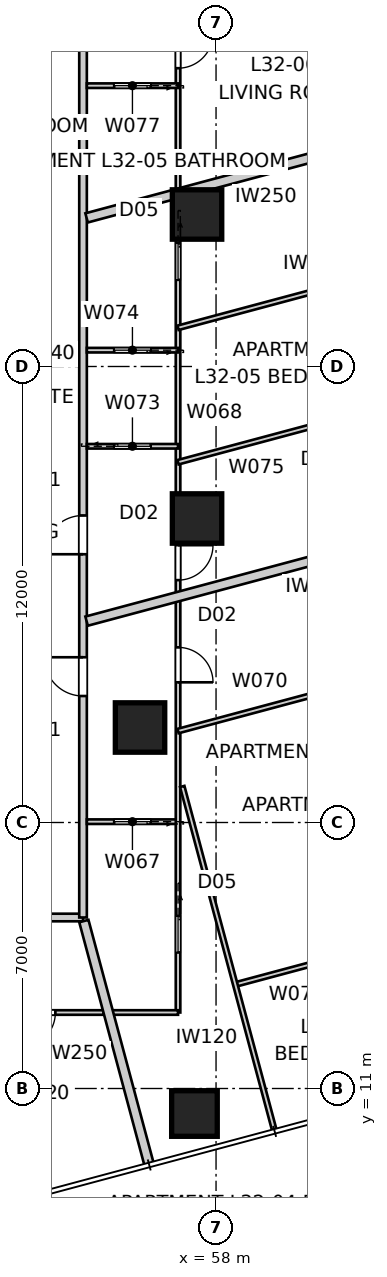
"""IFC4 building model, lengths in metres.
Left out: names, types, materials, properties, quantities, classifications, styles, units other than length and angle.
Written with IfcOpenShell. Run it as: python <this file> out.ifc"""

import sys

from ifc_helpers import new_model, si_unit, direction, frame, frame_2d, origin, origin_2d, place, context, subcontext, project, spatial, rectangle, extrude, element, fill, save


model = new_model("IFC4")
c1 = context("Model", 3, precision=1e-05, world=origin(), true_north=direction((0.0, 1.0)))
c2 = subcontext(c1, "Body", "Model", "MODEL_VIEW")
j1 = project(units=[si_unit("LENGTHUNIT", "METRE"), si_unit("PLANEANGLEUNIT", "RADIAN")], contexts=[c1])
p1 = place(None, origin())
s1 = spatial("IfcSite", under=j1, at=p1, CompositionType="ELEMENT")
p2 = place(p1, origin())
s2 = spatial("IfcBuilding", under=s1, at=p2, CompositionType="ELEMENT")
p3 = place(p2, frame((0.0, 0.0, 118.4)))
s3 = spatial("IfcBuildingStorey", under=s2, at=p3, CompositionType="ELEMENT", Elevation=118.4)
p4 = place(p3, frame((57.432, 10.342, 0.0), z_axis=(0.0, 0.0, 1.0), x_axis=(1.0, 0.0, 0.0)))
e1 = element("IfcColumn", 1, at=p4, inside=s3, PredefinedType="COLUMN", context=c2, shape_type="SweptSolid", body=[
    extrude(rectangle(XDim=1.2, YDim=1.2, at=origin_2d()), origin(), (0.0, 0.0, 1.0), 3.4),
])
for number, where, z_axis, x_axis in (
    (2, (57.5, 26.0, 0.0), (0.0, 0.0, 1.0), (1.0, 0.0, 0.0)),
    (3, (57.5, 34.0, 0.0), (0.0, 0.0, 1.0), (1.0, 0.0, 0.0)),
    (4, (56.0, 20.5, 0.0), (0.0, 0.0, 1.0), (1.0, 0.0, 0.0)),
):
    element("IfcColumn", number, at=place(p3, frame(where, z_axis=z_axis, x_axis=x_axis)), inside=s3, PredefinedType="COLUMN", context=c2, shape_type="SweptSolid", body=[
        extrude(rectangle(XDim=1.3, YDim=1.3, at=origin_2d()), origin(), (0.0, 0.0, 1.0), 3.4),
    ])
p5 = place(p3, frame((26.3, 15.5, 0.0), z_axis=(0.0, 0.0, 1.0), x_axis=(1.0, 0.0, 0.0)))
e5 = element("IfcWall", 5, at=p5, inside=s3, PredefinedType="PARTITIONING", context=c2, shape_type="SweptSolid", body=[
    extrude(rectangle(XDim=28.2, YDim=0.2, at=frame_2d((14.1, 0.0))), origin(), (0.0, 0.0, 1.0), 3.25),
])
p6 = place(p5, frame((21.474, 0.0, 0.0)))
e6 = element("IfcOpeningElement", 6, at=p6, cuts=e5, PredefinedType="OPENING", context=c2, shape_type="SweptSolid", body=[
    extrude(rectangle(XDim=1.02, YDim=2.34, at=frame_2d((0.51, 1.17))), frame((0.0, 0.11, 0.0), z_axis=(0.0, -1.0, 0.0), x_axis=(1.0, 0.0, 0.0)), (0.0, 0.0, 1.0), 0.22),
])
p7 = place(p5, frame((1.353, 0.0, 0.0)))
e7 = element("IfcOpeningElement", 7, at=p7, cuts=e5, PredefinedType="OPENING", context=c2, shape_type="SweptSolid", body=[
    extrude(rectangle(XDim=1.02, YDim=2.1, at=frame_2d((0.51, 1.05))), frame((0.0, 0.11, 0.0), z_axis=(0.0, -1.0, 0.0), x_axis=(1.0, 0.0, 0.0)), (0.0, 0.0, 1.0), 0.22),
])
p8 = place(p3, frame((54.5, 15.5, 0.0), z_axis=(0.0, 0.0, 1.0), x_axis=(0.0, 1.0, 0.0)))
e8 = element("IfcWall", 8, at=p8, inside=s3, PredefinedType="PARTITIONING", context=c2, shape_type="SweptSolid", body=[
    extrude(rectangle(XDim=29.0, YDim=0.2, at=frame_2d((14.5, 0.0))), origin(), (0.0, 0.0, 1.0), 3.25),
])
p9 = place(p8, frame((24.76, 0.0, 0.0)))
e9 = element("IfcOpeningElement", 9, at=p9, cuts=e8, PredefinedType="OPENING", context=c2, shape_type="SweptSolid", body=[
    extrude(rectangle(XDim=1.02, YDim=2.1, at=frame_2d((0.51, 1.05))), frame((0.0, 0.11, 0.0), z_axis=(0.0, -1.0, 0.0), x_axis=(1.0, 0.0, 0.0)), (0.0, 0.0, 1.0), 0.22),
])
p10 = place(p8, frame((5.829, 0.0, 0.0)))
e10 = element("IfcOpeningElement", 10, at=p10, cuts=e8, PredefinedType="OPENING", context=c2, shape_type="SweptSolid", body=[
    extrude(rectangle(XDim=1.02, YDim=2.34, at=frame_2d((0.51, 1.17))), frame((0.0, 0.11, 0.0), z_axis=(0.0, -1.0, 0.0), x_axis=(1.0, 0.0, 0.0)), (0.0, 0.0, 1.0), 0.22),
])
p11 = place(p8, frame((9.559, 0.0, 0.0)))
e11 = element("IfcOpeningElement", 11, at=p11, cuts=e8, PredefinedType="OPENING", context=c2, shape_type="SweptSolid", body=[
    extrude(rectangle(XDim=1.02, YDim=2.34, at=frame_2d((0.51, 1.17))), frame((0.0, 0.11, 0.0), z_axis=(0.0, -1.0, 0.0), x_axis=(1.0, 0.0, 0.0)), (0.0, 0.0, 1.0), 0.22),
])
p12 = place(p3, frame((56.242, 8.988, 0.0), z_axis=(0.0, 0.0, 1.0), x_axis=(-0.25880587229, 0.965929355837, 0.0)))
e12 = element("IfcWall", 12, at=p12, inside=s3, PredefinedType="PARTITIONING", context=c2, shape_type="SweptSolid", body=[
    extrude(rectangle(XDim=6.645, YDim=0.25, at=frame_2d((3.322, 0.0))), origin(), (0.0, 0.0, 1.0), 3.25),
])
p13 = place(p3, frame((63.665, 36.341, 0.0), z_axis=(0.0, 0.0, 1.0), x_axis=(-0.965927049013, -0.258814481793, 0.0)))
e13 = element("IfcWall", 13, at=p13, inside=s3, PredefinedType="PARTITIONING", context=c2, shape_type="SweptSolid", body=[
    extrude(rectangle(XDim=9.392, YDim=0.25, at=frame_2d((4.696, 0.0))), origin(), (0.0, 0.0, 1.0), 3.25),
])
p14 = place(p3, frame((66.318, 26.44, 0.0), z_axis=(0.0, 0.0, 1.0), x_axis=(-0.965924438766, -0.258824223352, 0.0)))
e14 = element("IfcWall", 14, at=p14, inside=s3, PredefinedType="PARTITIONING", context=c2, shape_type="SweptSolid", body=[
    extrude(rectangle(XDim=12.138, YDim=0.25, at=frame_2d((6.069, 0.0))), origin(), (0.0, 0.0, 1.0), 3.25),
])
p15 = place(p3, frame((55.046, 13.0, 0.0), z_axis=(0.0, 0.0, 1.0), x_axis=(-1.0, 0.0, 0.0)))
e15 = element("IfcWall", 15, at=p15, inside=s3, PredefinedType="PARTITIONING", context=c2, shape_type="SweptSolid", body=[
    extrude(rectangle(XDim=23.693, YDim=0.12, at=frame_2d((11.846, 0.0))), origin(), (0.0, 0.0, 1.0), 2.55),
])
p16 = place(p15, frame((8.262, 0.0, 0.0)))
e16 = element("IfcOpeningElement", 16, at=p16, cuts=e15, PredefinedType="OPENING", context=c2, shape_type="SweptSolid", body=[
    extrude(rectangle(XDim=0.92, YDim=2.34, at=frame_2d((0.46, 1.17))), frame((0.0, 0.07, 0.0), z_axis=(0.0, -1.0, 0.0), x_axis=(1.0, 0.0, 0.0)), (0.0, 0.0, 1.0), 0.14),
])
p17 = place(p15, frame((3.825, 0.0, 0.0)))
e17 = element("IfcOpeningElement", 17, at=p17, cuts=e15, PredefinedType="OPENING", context=c2, shape_type="SweptSolid", body=[
    extrude(rectangle(XDim=0.92, YDim=2.34, at=frame_2d((0.46, 1.17))), frame((0.0, 0.07, 0.0), z_axis=(0.0, -1.0, 0.0), x_axis=(1.0, 0.0, 0.0)), (0.0, 0.0, 1.0), 0.14),
])
p18 = place(p15, frame((1.274, 0.0, 0.0)))
e18 = element("IfcOpeningElement", 18, at=p18, cuts=e15, PredefinedType="OPENING", context=c2, shape_type="SweptSolid", body=[
    extrude(rectangle(XDim=0.92, YDim=2.34, at=frame_2d((0.46, 1.17))), frame((0.0, 0.07, 0.0), z_axis=(0.0, -1.0, 0.0), x_axis=(1.0, 0.0, 0.0)), (0.0, 0.0, 1.0), 0.14),
])
p19 = place(p15, frame((13.041, 0.0, 0.0)))
e19 = element("IfcOpeningElement", 19, at=p19, cuts=e15, PredefinedType="OPENING", context=c2, shape_type="SweptSolid", body=[
    extrude(rectangle(XDim=0.96, YDim=2.1, at=frame_2d((0.48, 1.05))), frame((0.0, 0.07, 0.0), z_axis=(0.0, -1.0, 0.0), x_axis=(1.0, 0.0, 0.0)), (0.0, 0.0, 1.0), 0.14),
])
p20 = place(p15, frame((21.917, 0.0, 0.0)))
e20 = element("IfcOpeningElement", 20, at=p20, cuts=e15, PredefinedType="OPENING", context=c2, shape_type="SweptSolid", body=[
    extrude(rectangle(XDim=0.96, YDim=2.1, at=frame_2d((0.48, 1.05))), frame((0.0, 0.07, 0.0), z_axis=(0.0, -1.0, 0.0), x_axis=(1.0, 0.0, 0.0)), (0.0, 0.0, 1.0), 0.14),
])
p21 = place(p3, frame((57.0, 18.021, 0.0), z_axis=(0.0, 0.0, 1.0), x_axis=(-1.0, 0.0, 0.0)))
e21 = element("IfcWall", 21, at=p21, inside=s3, PredefinedType="PARTITIONING", context=c2, shape_type="SweptSolid", body=[
    extrude(rectangle(XDim=2.4, YDim=0.12, at=frame_2d((1.2, 0.0))), origin(), (0.0, 0.0, 1.0), 3.25),
])
p22 = place(p21, frame((0.72, 0.0, 0.0)))
e22 = element("IfcOpeningElement", 22, at=p22, cuts=e21, PredefinedType="OPENING", context=c2, shape_type="SweptSolid", body=[
    extrude(rectangle(XDim=0.96, YDim=2.1, at=frame_2d((0.48, 1.05))), frame((0.0, 0.07, 0.0), z_axis=(0.0, -1.0, 0.0), x_axis=(1.0, 0.0, 0.0)), (0.0, 0.0, 1.0), 0.14),
])
p23 = place(p3, frame((57.0, 47.0, 0.0), z_axis=(0.0, 0.0, 1.0), x_axis=(0.0, -1.0, 0.0)))
e23 = element("IfcWall", 23, at=p23, inside=s3, PredefinedType="PARTITIONING", context=c2, shape_type="SweptSolid", body=[
    extrude(rectangle(XDim=34.0, YDim=0.12, at=frame_2d((17.0, 0.0))), origin(), (0.0, 0.0, 1.0), 2.55),
])
p24 = place(p23, frame((8.23, 0.0, 0.0)))
e24 = element("IfcOpeningElement", 24, at=p24, cuts=e23, PredefinedType="OPENING", context=c2, shape_type="SweptSolid", body=[
    extrude(rectangle(XDim=0.92, YDim=2.34, at=frame_2d((0.46, 1.17))), frame((0.0, 0.07, 0.0), z_axis=(0.0, -1.0, 0.0), x_axis=(1.0, 0.0, 0.0)), (0.0, 0.0, 1.0), 0.14),
])
p25 = place(p23, frame((3.192, 0.0, 0.0)))
e25 = element("IfcOpeningElement", 25, at=p25, cuts=e23, PredefinedType="OPENING", context=c2, shape_type="SweptSolid", body=[
    extrude(rectangle(XDim=0.92, YDim=2.34, at=frame_2d((0.46, 1.17))), frame((0.0, 0.07, 0.0), z_axis=(0.0, -1.0, 0.0), x_axis=(1.0, 0.0, 0.0)), (0.0, 0.0, 1.0), 0.14),
])
p26 = place(p23, frame((24.391, 0.0, 0.0)))
e26 = element("IfcOpeningElement", 26, at=p26, cuts=e23, PredefinedType="OPENING", context=c2, shape_type="SweptSolid", body=[
    extrude(rectangle(XDim=0.92, YDim=2.34, at=frame_2d((0.46, 1.17))), frame((0.0, 0.07, 0.0), z_axis=(0.0, -1.0, 0.0), x_axis=(1.0, 0.0, 0.0)), (0.0, 0.0, 1.0), 0.14),
])
p27 = place(p23, frame((21.702, 0.0, 0.0)))
e27 = element("IfcOpeningElement", 27, at=p27, cuts=e23, PredefinedType="OPENING", context=c2, shape_type="SweptSolid", body=[
    extrude(rectangle(XDim=0.92, YDim=2.34, at=frame_2d((0.46, 1.17))), frame((0.0, 0.07, 0.0), z_axis=(0.0, -1.0, 0.0), x_axis=(1.0, 0.0, 0.0)), (0.0, 0.0, 1.0), 0.14),
])
p28 = place(p23, frame((31.459, 0.0, 0.0)))
e28 = element("IfcOpeningElement", 28, at=p28, cuts=e23, PredefinedType="OPENING", context=c2, shape_type="SweptSolid", body=[
    extrude(rectangle(XDim=0.96, YDim=2.1, at=frame_2d((0.48, 1.05))), frame((0.0, 0.07, 0.0), z_axis=(0.0, -1.0, 0.0), x_axis=(1.0, 0.0, 0.0)), (0.0, 0.0, 1.0), 0.14),
])
p29 = place(p23, frame((13.759, 0.0, 0.0)))
e29 = element("IfcOpeningElement", 29, at=p29, cuts=e23, PredefinedType="OPENING", context=c2, shape_type="SweptSolid", body=[
    extrude(rectangle(XDim=0.96, YDim=2.1, at=frame_2d((0.48, 1.05))), frame((0.0, 0.07, 0.0), z_axis=(0.0, -1.0, 0.0), x_axis=(1.0, 0.0, 0.0)), (0.0, 0.0, 1.0), 0.14),
])
p30 = place(p3, frame((57.0, 13.0, 0.0), z_axis=(0.0, 0.0, 1.0), x_axis=(-1.0, 0.0, 0.0)))
e30 = element("IfcWall", 30, at=p30, inside=s3, PredefinedType="PARTITIONING", context=c2, shape_type="SweptSolid", body=[
    extrude(rectangle(XDim=1.833, YDim=0.12, at=frame_2d((0.917, 0.0))), origin(), (0.0, 0.0, 1.0), 3.25),
])
p31 = place(p3, frame((57.0, 20.406, 0.0), z_axis=(0.0, 0.0, 1.0), x_axis=(0.9659257847, 0.258819200315, 0.0)))
e31 = element("IfcWall", 31, at=p31, inside=s3, PredefinedType="PARTITIONING", context=c2, shape_type="SweptSolid", body=[
    extrude(rectangle(XDim=10.522, YDim=0.12, at=frame_2d((5.261, 0.0))), origin(), (0.0, 0.0, 1.0), 2.722),
])
p32 = place(p31, frame((4.821, 0.0, 0.0)))
e32 = element("IfcOpeningElement", 32, at=p32, cuts=e31, PredefinedType="OPENING", context=c2, shape_type="SweptSolid", body=[
    extrude(rectangle(XDim=0.92, YDim=2.34, at=frame_2d((0.46, 1.17))), frame((0.0, 0.07, 0.0), z_axis=(0.0, -1.0, 0.0), x_axis=(1.0, 0.0, 0.0)), (0.0, 0.0, 1.0), 0.14),
])
p33 = place(p3, frame((65.069, 15.494, 0.0), z_axis=(0.0, 0.0, 1.0), x_axis=(-0.965922865286, -0.258830095464, 0.0)))
e33 = element("IfcWall", 33, at=p33, inside=s3, PredefinedType="PARTITIONING", context=c2, shape_type="SweptSolid", body=[
    extrude(rectangle(XDim=6.793, YDim=0.12, at=frame_2d((3.396, 0.0))), origin(), (0.0, 0.0, 1.0), 3.25),
])
p34 = place(p33, frame((2.892, 0.0, 0.0)))
e34 = element("IfcOpeningElement", 34, at=p34, cuts=e33, PredefinedType="OPENING", context=c2, shape_type="SweptSolid", body=[
    extrude(rectangle(XDim=0.92, YDim=2.34, at=frame_2d((0.46, 1.17))), frame((0.0, 0.07, 0.0), z_axis=(0.0, -1.0, 0.0), x_axis=(1.0, 0.0, 0.0)), (0.0, 0.0, 1.0), 0.14),
])
p35 = place(p3, frame((59.532, 9.911, 0.0), z_axis=(0.0, 0.0, 1.0), x_axis=(-0.25881390457, 0.965927203676, 0.0)))
e35 = element("IfcWall", 35, at=p35, inside=s3, PredefinedType="PARTITIONING", context=c2, shape_type="SweptSolid", body=[
    extrude(rectangle(XDim=9.357, YDim=0.12, at=frame_2d((4.678, 0.0))), origin(), (0.0, 0.0, 1.0), 2.638),
])
p36 = place(p3, frame((54.6, 27.901, 0.0), z_axis=(0.0, 0.0, 1.0), x_axis=(1.0, 0.0, 0.0)))
e36 = element("IfcWall", 36, at=p36, inside=s3, PredefinedType="PARTITIONING", context=c2, shape_type="SweptSolid", body=[
    extrude(rectangle(XDim=2.4, YDim=0.12, at=frame_2d((1.2, 0.0))), origin(), (0.0, 0.0, 1.0), 3.25),
])
p37 = place(p36, frame((0.72, 0.0, 0.0)))
e37 = element("IfcOpeningElement", 37, at=p37, cuts=e36, PredefinedType="OPENING", context=c2, shape_type="SweptSolid", body=[
    extrude(rectangle(XDim=0.96, YDim=2.1, at=frame_2d((0.48, 1.05))), frame((0.0, 0.07, 0.0), z_axis=(0.0, -1.0, 0.0), x_axis=(1.0, 0.0, 0.0)), (0.0, 0.0, 1.0), 0.14),
])
p38 = place(p3, frame((57.0, 30.43, 0.0), z_axis=(0.0, 0.0, 1.0), x_axis=(-1.0, 0.0, 0.0)))
e38 = element("IfcWall", 38, at=p38, inside=s3, PredefinedType="PARTITIONING", context=c2, shape_type="SweptSolid", body=[
    extrude(rectangle(XDim=2.4, YDim=0.12, at=frame_2d((1.2, 0.0))), origin(), (0.0, 0.0, 1.0), 3.25),
])
p39 = place(p38, frame((0.72, 0.0, 0.0)))
e39 = element("IfcOpeningElement", 39, at=p39, cuts=e38, PredefinedType="OPENING", context=c2, shape_type="SweptSolid", body=[
    extrude(rectangle(XDim=0.96, YDim=2.1, at=frame_2d((0.48, 1.05))), frame((0.0, 0.07, 0.0), z_axis=(0.0, -1.0, 0.0), x_axis=(1.0, 0.0, 0.0)), (0.0, 0.0, 1.0), 0.14),
])
p40 = place(p3, frame((57.0, 27.481, 0.0), z_axis=(0.0, 0.0, 1.0), x_axis=(0.965925607751, 0.258819860698, 0.0)))
e40 = element("IfcWall", 40, at=p40, inside=s3, PredefinedType="PARTITIONING", context=c2, shape_type="SweptSolid", body=[
    extrude(rectangle(XDim=8.691, YDim=0.12, at=frame_2d((4.346, 0.0))), origin(), (0.0, 0.0, 1.0), 3.25),
])
p41 = place(p40, frame((3.906, 0.0, 0.0)))
e41 = element("IfcOpeningElement", 41, at=p41, cuts=e40, PredefinedType="OPENING", context=c2, shape_type="SweptSolid", body=[
    extrude(rectangle(XDim=0.92, YDim=2.34, at=frame_2d((0.46, 1.17))), frame((0.0, 0.07, 0.0), z_axis=(0.0, -1.0, 0.0), x_axis=(1.0, 0.0, 0.0)), (0.0, 0.0, 1.0), 0.14),
])
p42 = place(p3, frame((57.0, 31.018, 0.0), z_axis=(0.0, 0.0, 1.0), x_axis=(0.965927309482, 0.258813509689, 0.0)))
e42 = element("IfcWall", 42, at=p42, inside=s3, PredefinedType="PARTITIONING", context=c2, shape_type="SweptSolid", body=[
    extrude(rectangle(XDim=7.776, YDim=0.12, at=frame_2d((3.888, 0.0))), origin(), (0.0, 0.0, 1.0), 3.25),
])
p43 = place(p3, frame((57.0, 37.39, 0.0), z_axis=(0.0, 0.0, 1.0), x_axis=(-1.0, 0.0, 0.0)))
e43 = element("IfcWall", 43, at=p43, inside=s3, PredefinedType="PARTITIONING", context=c2, shape_type="SweptSolid", body=[
    extrude(rectangle(XDim=2.4, YDim=0.12, at=frame_2d((1.2, 0.0))), origin(), (0.0, 0.0, 1.0), 3.25),
])
p44 = place(p43, frame((0.72, 0.0, 0.0)))
e44 = element("IfcOpeningElement", 44, at=p44, cuts=e43, PredefinedType="OPENING", context=c2, shape_type="SweptSolid", body=[
    extrude(rectangle(XDim=0.96, YDim=2.1, at=frame_2d((0.48, 1.05))), frame((0.0, 0.07, 0.0), z_axis=(0.0, -1.0, 0.0), x_axis=(1.0, 0.0, 0.0)), (0.0, 0.0, 1.0), 0.14),
])
p45 = place(p10, origin())
e45 = element("IfcDoor", 45, at=p45, inside=s3, OperationType="SINGLE_SWING_RIGHT", PredefinedType="DOOR", context=c2, shape_type="SweptSolid", body=[
    extrude(rectangle(XDim=1.02, YDim=2.34, at=frame_2d((0.51, 1.17))), frame((0.0, 0.025, 0.0), z_axis=(0.0, -1.0, 0.0), x_axis=(1.0, 0.0, 0.0)), (0.0, 0.0, 1.0), 0.05),
])
fill(e10, e45)
p46 = place(p11, origin())
e46 = element("IfcDoor", 46, at=p46, inside=s3, OperationType="SINGLE_SWING_LEFT", PredefinedType="DOOR", context=c2, shape_type="SweptSolid", body=[
    extrude(rectangle(XDim=1.02, YDim=2.34, at=frame_2d((0.51, 1.17))), frame((0.0, 0.025, 0.0), z_axis=(0.0, -1.0, 0.0), x_axis=(1.0, 0.0, 0.0)), (0.0, 0.0, 1.0), 0.05),
])
fill(e11, e46)
p47 = place(p18, origin())
e47 = element("IfcDoor", 47, at=p47, inside=s3, OperationType="SINGLE_SWING_RIGHT", PredefinedType="DOOR", context=c2, shape_type="SweptSolid", body=[
    extrude(rectangle(XDim=0.92, YDim=2.34, at=frame_2d((0.46, 1.17))), frame((0.0, 0.025, 0.0), z_axis=(0.0, -1.0, 0.0), x_axis=(1.0, 0.0, 0.0)), (0.0, 0.0, 1.0), 0.05),
])
fill(e18, e47)
p48 = place(p24, origin())
e48 = element("IfcDoor", 48, at=p48, inside=s3, OperationType="SINGLE_SWING_LEFT", PredefinedType="DOOR", context=c2, shape_type="SweptSolid", body=[
    extrude(rectangle(XDim=0.92, YDim=2.34, at=frame_2d((0.46, 1.17))), frame((0.0, 0.025, 0.0), z_axis=(0.0, -1.0, 0.0), x_axis=(1.0, 0.0, 0.0)), (0.0, 0.0, 1.0), 0.05),
])
fill(e24, e48)
p49 = place(p44, origin())
e49 = element("IfcDoor", 49, at=p49, inside=s3, OperationType="SLIDING_TO_LEFT", PredefinedType="DOOR", context=c2, shape_type="SweptSolid", body=[
    extrude(rectangle(XDim=0.96, YDim=2.1, at=frame_2d((0.48, 1.05))), frame((0.0, 0.025, 0.0), z_axis=(0.0, -1.0, 0.0), x_axis=(1.0, 0.0, 0.0)), (0.0, 0.0, 1.0), 0.05),
])
fill(e44, e49)
p50 = place(p26, origin())
e50 = element("IfcDoor", 50, at=p50, inside=s3, OperationType="SINGLE_SWING_RIGHT", PredefinedType="DOOR", context=c2, shape_type="SweptSolid", body=[
    extrude(rectangle(XDim=0.92, YDim=2.34, at=frame_2d((0.46, 1.17))), frame((0.0, 0.025, 0.0), z_axis=(0.0, -1.0, 0.0), x_axis=(1.0, 0.0, 0.0)), (0.0, 0.0, 1.0), 0.05),
])
fill(e26, e50)
p51 = place(p22, origin())
e51 = element("IfcDoor", 51, at=p51, inside=s3, OperationType="SLIDING_TO_LEFT", PredefinedType="DOOR", context=c2, shape_type="SweptSolid", body=[
    extrude(rectangle(XDim=0.96, YDim=2.1, at=frame_2d((0.48, 1.05))), frame((0.0, 0.025, 0.0), z_axis=(0.0, -1.0, 0.0), x_axis=(1.0, 0.0, 0.0)), (0.0, 0.0, 1.0), 0.05),
])
fill(e22, e51)
p52 = place(p27, origin())
e52 = element("IfcDoor", 52, at=p52, inside=s3, OperationType="SINGLE_SWING_LEFT", PredefinedType="DOOR", context=c2, shape_type="SweptSolid", body=[
    extrude(rectangle(XDim=0.92, YDim=2.34, at=frame_2d((0.46, 1.17))), frame((0.0, 0.025, 0.0), z_axis=(0.0, -1.0, 0.0), x_axis=(1.0, 0.0, 0.0)), (0.0, 0.0, 1.0), 0.05),
])
fill(e27, e52)
p53 = place(p37, origin())
e53 = element("IfcDoor", 53, at=p53, inside=s3, OperationType="SLIDING_TO_LEFT", PredefinedType="DOOR", context=c2, shape_type="SweptSolid", body=[
    extrude(rectangle(XDim=0.96, YDim=2.1, at=frame_2d((0.48, 1.05))), frame((0.0, 0.025, 0.0), z_axis=(0.0, -1.0, 0.0), x_axis=(1.0, 0.0, 0.0)), (0.0, 0.0, 1.0), 0.05),
])
fill(e37, e53)
p54 = place(p28, origin())
e54 = element("IfcDoor", 54, at=p54, inside=s3, OperationType="SLIDING_TO_LEFT", PredefinedType="DOOR", context=c2, shape_type="SweptSolid", body=[
    extrude(rectangle(XDim=0.96, YDim=2.1, at=frame_2d((0.48, 1.05))), frame((0.0, 0.025, 0.0), z_axis=(0.0, -1.0, 0.0), x_axis=(1.0, 0.0, 0.0)), (0.0, 0.0, 1.0), 0.05),
])
fill(e28, e54)
p55 = place(p39, origin())
e55 = element("IfcDoor", 55, at=p55, inside=s3, OperationType="SLIDING_TO_LEFT", PredefinedType="DOOR", context=c2, shape_type="SweptSolid", body=[
    extrude(rectangle(XDim=0.96, YDim=2.1, at=frame_2d((0.48, 1.05))), frame((0.0, 0.025, 0.0), z_axis=(0.0, -1.0, 0.0), x_axis=(1.0, 0.0, 0.0)), (0.0, 0.0, 1.0), 0.05),
])
fill(e39, e55)
p56 = place(p29, origin())
e56 = element("IfcDoor", 56, at=p56, inside=s3, OperationType="SLIDING_TO_LEFT", PredefinedType="DOOR", context=c2, shape_type="SweptSolid", body=[
    extrude(rectangle(XDim=0.96, YDim=2.1, at=frame_2d((0.48, 1.05))), frame((0.0, 0.025, 0.0), z_axis=(0.0, -1.0, 0.0), x_axis=(1.0, 0.0, 0.0)), (0.0, 0.0, 1.0), 0.05),
])
fill(e29, e56)
save(model, sys.argv[1])
